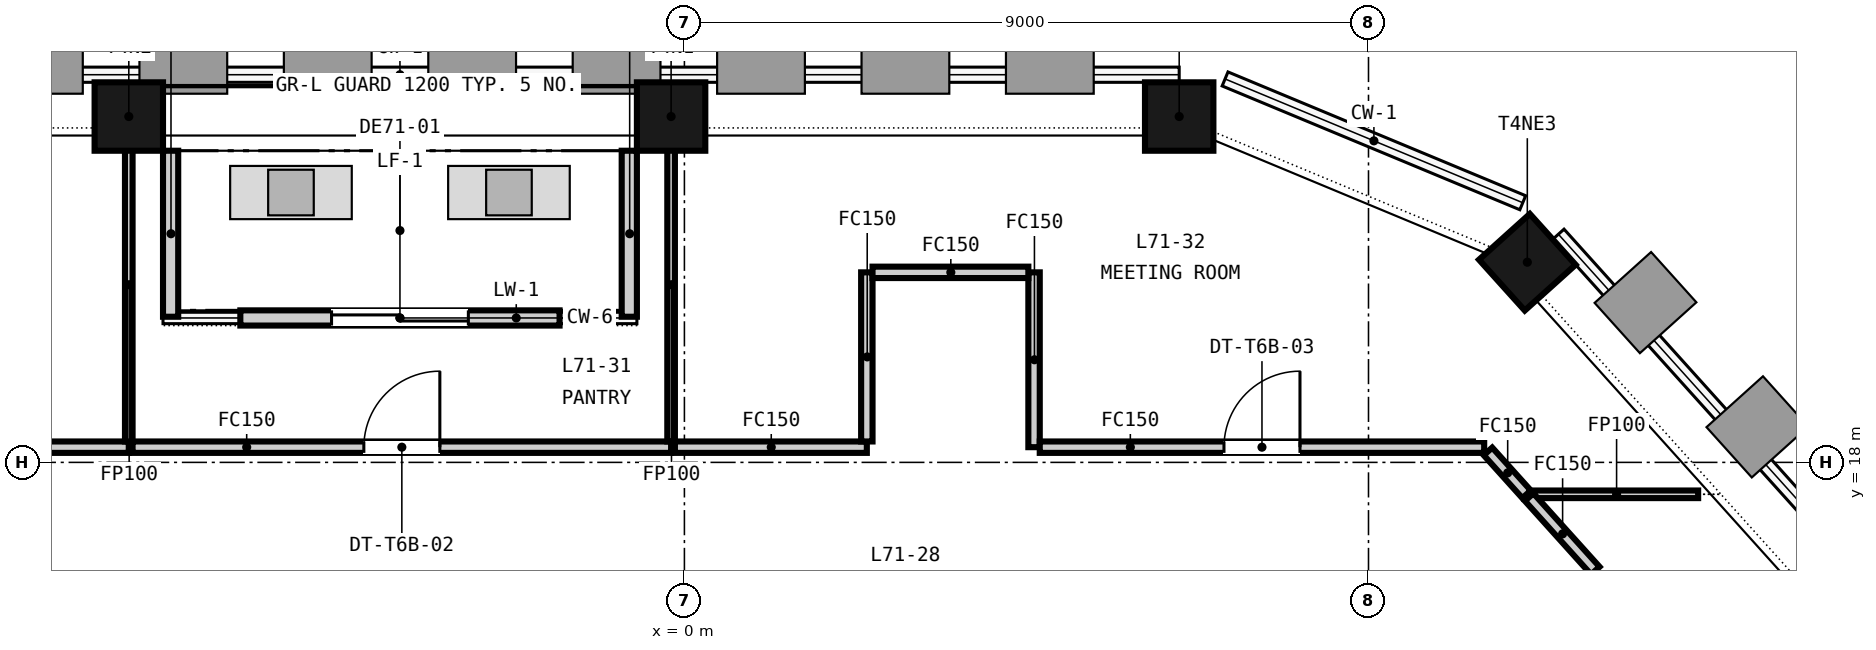
"""IFC4 building model, lengths in metres.
Left out: names, types, materials, properties, quantities, classifications, styles, units other than length and angle.
Written with IfcOpenShell. Run it as: python <this file> out.ifc"""

import sys

from ifc_helpers import new_model, si_unit, direction, frame, frame_2d, origin, origin_2d, place, context, subcontext, project, spatial, rectangle, extrude, element, fill, save


model = new_model("IFC4")
c1 = context("Model", 3, precision=1e-05, world=origin(), true_north=direction((0.0, 1.0)))
c2 = subcontext(c1, "Body", "Model", "MODEL_VIEW")
j1 = project(units=[si_unit("LENGTHUNIT", "METRE"), si_unit("PLANEANGLEUNIT", "RADIAN")], contexts=[c1])
p1 = place(None, origin())
s1 = spatial("IfcSite", under=j1, at=p1, CompositionType="ELEMENT")
p2 = place(p1, origin())
s2 = spatial("IfcBuilding", under=s1, at=p2, CompositionType="ELEMENT")
p3 = place(p2, frame((0.0, 0.0, 279.2)))
s3 = spatial("IfcBuildingStorey", under=s2, at=p3, CompositionType="ELEMENT", Elevation=279.2)
for number, where, z_axis, x_axis in (
    (1, (6.51, 22.55, -0.15), (0.0, 0.0, 1.0), (-1.0, 0.0, 0.0)),
    (2, (-0.175, 22.55, -0.15), (0.0, 0.0, 1.0), (-1.0, 0.0, 0.0)),
    (3, (-7.31, 22.55, -0.15), (0.0, 0.0, 1.0), (-1.0, 0.0, 0.0)),
    (4, (11.089, 20.633, -0.15), (0.0, 0.0, 1.0), (-0.669, 0.743, 0.0)),
):
    element("IfcColumn", number, at=place(p3, frame(where, z_axis=z_axis, x_axis=x_axis)), inside=s3, PredefinedType="COLUMN", context=c2, shape_type="SweptSolid", body=[
        extrude(rectangle(XDim=0.9, YDim=0.9, at=origin_2d()), origin(), (0.0, 0.0, 1.0), 3.65),
    ])
p4 = place(p3, frame((-1.642, 19.9, 0.0), z_axis=(0.0, 0.0, 1.0), x_axis=(-1.0, 0.0, 0.0)))
e5 = element("IfcWall", 5, at=p4, inside=s3, PredefinedType="SOLIDWALL", context=c2, shape_type="SweptSolid", body=[
    extrude(rectangle(XDim=4.2, YDim=0.2, at=frame_2d((2.1, 0.0))), origin(), (0.0, 0.0, 1.0), 2.9),
])
p5 = place(p4, frame((1.2, 0.0, 0.0)))
e6 = element("IfcOpeningElement", 6, at=p5, cuts=e5, PredefinedType="OPENING", context=c2, shape_type="SweptSolid", body=[
    extrude(rectangle(XDim=1.8, YDim=2.4, at=frame_2d((0.9, 1.2))), frame((0.0, 0.11, 0.0), z_axis=(0.0, -1.0, 0.0), x_axis=(1.0, 0.0, 0.0)), (0.0, 0.0, 1.0), 0.22),
])
for number, where, z_axis, x_axis in (
    (7, (-0.725, 22.1, 0.0), (0.0, 0.0, 1.0), (0.0, -1.0, 0.0)),
    (8, (-6.76, 22.1, 0.0), (0.0, 0.0, 1.0), (0.0, -1.0, 0.0)),
):
    element("IfcWall", number, at=place(p3, frame(where, z_axis=z_axis, x_axis=x_axis)), inside=s3, PredefinedType="SOLIDWALL", context=c2, shape_type="SweptSolid", body=[
        extrude(rectangle(XDim=2.184, YDim=0.2, at=frame_2d((1.092, 0.0))), origin(), (0.0, 0.0, 1.0), 3.05),
    ])
p6 = place(p3, frame((4.6, 20.5, 0.0), z_axis=(0.0, 0.0, 1.0), x_axis=(0.0, -1.0, 0.0)))
e9 = element("IfcWall", 9, at=p6, inside=s3, PredefinedType="PARTITIONING", context=c2, shape_type="SweptSolid", body=[
    extrude(rectangle(XDim=2.3, YDim=0.15, at=frame_2d((1.15, 0.0))), origin(), (0.0, 0.0, 1.0), 2.751),
])
p7 = place(p3, frame((-15.038, 18.2, 0.0), z_axis=(0.0, 0.0, 1.0), x_axis=(1.0, 0.0, 0.0)))
e10 = element("IfcWall", 10, at=p7, inside=s3, PredefinedType="PARTITIONING", context=c2, shape_type="SweptSolid", body=[
    extrude(rectangle(XDim=7.728, YDim=0.15, at=frame_2d((3.864, 0.0))), origin(), (0.0, 0.0, 1.0), 2.751),
])
p8 = place(p7, frame((3.364, 0.0, 0.0)))
e11 = element("IfcOpeningElement", 11, at=p8, cuts=e10, PredefinedType="OPENING", context=c2, shape_type="SweptSolid", body=[
    extrude(rectangle(XDim=1.0, YDim=2.1, at=frame_2d((0.5, 1.05))), frame((0.0, 0.085, 0.0), z_axis=(0.0, -1.0, 0.0), x_axis=(1.0, 0.0, 0.0)), (0.0, 0.0, 1.0), 0.17),
])
p9 = place(p3, frame((-7.31, 18.275, 0.0), z_axis=(0.0, 0.0, 1.0), x_axis=(0.0, 1.0, 0.0)))
e12 = element("IfcWall", 12, at=p9, inside=s3, PredefinedType="PARTITIONING", context=c2, shape_type="SweptSolid", body=[
    extrude(rectangle(XDim=4.125, YDim=0.1, at=frame_2d((2.062, 0.0))), origin(), (0.0, 0.0, 1.0), 2.751),
])
p10 = place(p3, frame((-7.26, 18.2, 0.0), z_axis=(0.0, 0.0, 1.0), x_axis=(1.0, 0.0, 0.0)))
e13 = element("IfcWall", 13, at=p10, inside=s3, PredefinedType="PARTITIONING", context=c2, shape_type="SweptSolid", body=[
    extrude(rectangle(XDim=7.085, YDim=0.15, at=frame_2d((3.542, 0.0))), origin(), (0.0, 0.0, 1.0), 2.751),
])
p11 = place(p10, frame((3.042, 0.0, 0.0)))
e14 = element("IfcOpeningElement", 14, at=p11, cuts=e13, PredefinedType="OPENING", context=c2, shape_type="SweptSolid", body=[
    extrude(rectangle(XDim=1.0, YDim=2.1, at=frame_2d((0.5, 1.05))), frame((0.0, 0.085, 0.0), z_axis=(0.0, -1.0, 0.0), x_axis=(1.0, 0.0, 0.0)), (0.0, 0.0, 1.0), 0.17),
])
p12 = place(p3, frame((-0.175, 18.275, 0.0), z_axis=(0.0, 0.0, 1.0), x_axis=(0.0, 1.0, 0.0)))
e15 = element("IfcWall", 15, at=p12, inside=s3, PredefinedType="PARTITIONING", context=c2, shape_type="SweptSolid", body=[
    extrude(rectangle(XDim=4.125, YDim=0.1, at=frame_2d((2.062, 0.0))), origin(), (0.0, 0.0, 1.0), 2.751),
])
p13 = place(p3, frame((-0.125, 18.2, 0.0), z_axis=(0.0, 0.0, 1.0), x_axis=(1.0, 0.0, 0.0)))
e16 = element("IfcWall", 16, at=p13, inside=s3, PredefinedType="PARTITIONING", context=c2, shape_type="SweptSolid", body=[
    extrude(rectangle(XDim=2.525, YDim=0.15, at=frame_2d((1.262, 0.0))), origin(), (0.0, 0.0, 1.0), 2.751),
])
p14 = place(p3, frame((2.4, 18.275, 0.0), z_axis=(0.0, 0.0, 1.0), x_axis=(0.0, 1.0, 0.0)))
e17 = element("IfcWall", 17, at=p14, inside=s3, PredefinedType="PARTITIONING", context=c2, shape_type="SweptSolid", body=[
    extrude(rectangle(XDim=2.225, YDim=0.15, at=frame_2d((1.113, 0.0))), origin(), (0.0, 0.0, 1.0), 2.751),
])
p15 = place(p3, frame((2.475, 20.5, 0.0), z_axis=(0.0, 0.0, 1.0), x_axis=(1.0, 0.0, 0.0)))
e18 = element("IfcWall", 18, at=p15, inside=s3, PredefinedType="PARTITIONING", context=c2, shape_type="SweptSolid", body=[
    extrude(rectangle(XDim=2.05, YDim=0.15, at=frame_2d((1.025, 0.0))), origin(), (0.0, 0.0, 1.0), 2.751),
])
p16 = place(p3, frame((4.675, 18.2, 0.0), z_axis=(0.0, 0.0, 1.0), x_axis=(1.0, 0.0, 0.0)))
e19 = element("IfcWall", 19, at=p16, inside=s3, PredefinedType="PARTITIONING", context=c2, shape_type="SweptSolid", body=[
    extrude(rectangle(XDim=5.847, YDim=0.15, at=frame_2d((2.923, 0.0))), origin(), (0.0, 0.0, 1.0), 2.751),
])
p17 = place(p16, frame((2.424, 0.0, 0.0)))
e20 = element("IfcOpeningElement", 20, at=p17, cuts=e19, PredefinedType="OPENING", context=c2, shape_type="SweptSolid", body=[
    extrude(rectangle(XDim=1.0, YDim=2.1, at=frame_2d((0.5, 1.05))), frame((0.0, 0.085, 0.0), z_axis=(0.0, -1.0, 0.0), x_axis=(1.0, 0.0, 0.0)), (0.0, 0.0, 1.0), 0.17),
])
p18 = place(p3, frame((10.572, 18.144, 0.0), z_axis=(0.0, 0.0, 1.0), x_axis=(0.668982500835, -0.743278153572, 0.0)))
e21 = element("IfcWall", 21, at=p18, inside=s3, PredefinedType="PARTITIONING", context=c2, shape_type="SweptSolid", body=[
    extrude(rectangle(XDim=0.759, YDim=0.15, at=frame_2d((0.379, 0.0))), origin(), (0.0, 0.0, 1.0), 2.751),
])
p19 = place(p3, frame((11.181, 17.58, 0.0), z_axis=(0.0, 0.0, 1.0), x_axis=(1.0, 0.0, 0.0)))
e22 = element("IfcWall", 22, at=p19, inside=s3, PredefinedType="PARTITIONING", context=c2, shape_type="SweptSolid", body=[
    extrude(rectangle(XDim=2.156, YDim=0.1, at=frame_2d((1.078, 0.0))), origin(), (0.0, 0.0, 1.0), 2.751),
])
p20 = place(p3, frame((11.114, 17.543, 0.0), z_axis=(0.0, 0.0, 1.0), x_axis=(0.66906841405, -0.743200818972, 0.0)))
e23 = element("IfcWall", 23, at=p20, inside=s3, PredefinedType="PARTITIONING", context=c2, shape_type="SweptSolid", body=[
    extrude(rectangle(XDim=1.301, YDim=0.15, at=frame_2d((0.65, 0.0))), origin(), (0.0, 0.0, 1.0), 2.751),
])
p21 = place(p5, origin())
e24 = element("IfcDoor", 24, at=p21, inside=s3, OperationType="SINGLE_SWING_LEFT", PredefinedType="DOOR", context=c2, shape_type="SweptSolid", body=[
    extrude(rectangle(XDim=1.8, YDim=2.4, at=frame_2d((0.9, 1.2))), frame((0.0, 0.025, 0.0), z_axis=(0.0, -1.0, 0.0), x_axis=(1.0, 0.0, 0.0)), (0.0, 0.0, 1.0), 0.05),
])
fill(e6, e24)
p22 = place(p11, origin())
e25 = element("IfcDoor", 25, at=p22, inside=s3, OperationType="SINGLE_SWING_RIGHT", PredefinedType="DOOR", context=c2, shape_type="SweptSolid", body=[
    extrude(rectangle(XDim=1.0, YDim=2.1, at=frame_2d((0.5, 1.05))), frame((0.0, 0.025, 0.0), z_axis=(0.0, -1.0, 0.0), x_axis=(1.0, 0.0, 0.0)), (0.0, 0.0, 1.0), 0.05),
])
fill(e14, e25)
p23 = place(p17, origin())
e26 = element("IfcDoor", 26, at=p23, inside=s3, OperationType="SINGLE_SWING_RIGHT", PredefinedType="DOOR", context=c2, shape_type="SweptSolid", body=[
    extrude(rectangle(XDim=1.0, YDim=2.1, at=frame_2d((0.5, 1.05))), frame((0.0, 0.025, 0.0), z_axis=(0.0, -1.0, 0.0), x_axis=(1.0, 0.0, 0.0)), (0.0, 0.0, 1.0), 0.05),
])
fill(e20, e26)
save(model, sys.argv[1])
